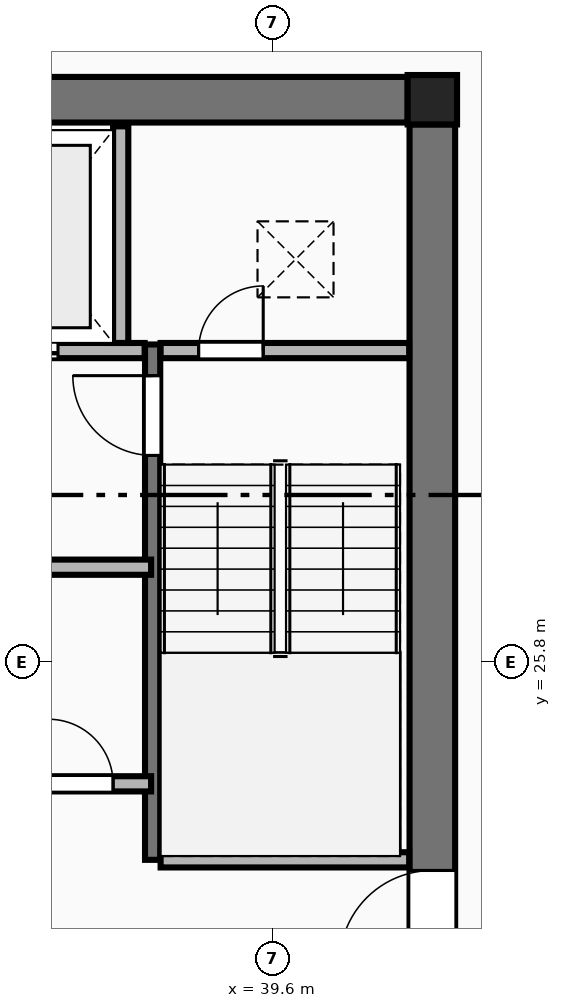
"""IFC4 building model, lengths in metres.
Left out: names, types, materials, properties, quantities, classifications, styles, units other than length and angle.
Written with IfcOpenShell. Run it as: python <this file> out.ifc"""

import sys

from ifc_helpers import new_model, si_unit, direction, frame, frame_2d, origin, origin_2d, place, context, subcontext, project, spatial, rectangle, extrude, element, fill, save


model = new_model("IFC4")
c1 = context("Model", 3, precision=1e-05, world=origin(), true_north=direction((0.0, 1.0)))
c2 = subcontext(c1, "Body", "Model", "MODEL_VIEW")
j1 = project(units=[si_unit("LENGTHUNIT", "METRE"), si_unit("PLANEANGLEUNIT", "RADIAN")], contexts=[c1])
p1 = place(None, origin())
s1 = spatial("IfcSite", under=j1, at=p1, CompositionType="ELEMENT")
p2 = place(p1, origin())
s2 = spatial("IfcBuilding", under=s1, at=p2, CompositionType="ELEMENT")
p3 = place(p2, frame((0.0, 0.0, 203.85)))
s3 = spatial("IfcBuildingStorey", under=s2, at=p3, CompositionType="ELEMENT", Elevation=203.85)
p4 = place(p3, frame((41.7, 33.2, 0.0), z_axis=(0.0, 0.0, 1.0), x_axis=(1.0, 0.0, 0.0)))
e1 = element("IfcColumn", 1, at=p4, inside=s3, PredefinedType="COLUMN", context=c2, shape_type="SweptSolid", body=[
    extrude(rectangle(XDim=0.65, YDim=0.65, at=origin_2d()), origin(), (0.0, 0.0, 1.0), 3.55),
])
p5 = place(p3, frame((23.425, 33.2, 0.0), z_axis=(0.0, 0.0, 1.0), x_axis=(1.0, 0.0, 0.0)))
e2 = element("IfcWall", 2, at=p5, inside=s3, PredefinedType="SHEAR", context=c2, shape_type="SweptSolid", body=[
    extrude(rectangle(XDim=17.95, YDim=0.6, at=frame_2d((8.975, 0.0))), origin(), (0.0, 0.0, 1.0), 3.35),
])
p6 = place(p3, frame((41.7, 18.925, 0.0), z_axis=(0.0, 0.0, 1.0), x_axis=(0.0, 1.0, 0.0)))
e3 = element("IfcWall", 3, at=p6, inside=s3, PredefinedType="SHEAR", context=c2, shape_type="SweptSolid", body=[
    extrude(rectangle(XDim=13.95, YDim=0.6, at=frame_2d((6.975, 0.0))), origin(), (0.0, 0.0, 1.0), 3.35),
])
p7 = place(p6, frame((2.915, 0.0, 0.0)))
e4 = element("IfcOpeningElement", 4, at=p7, cuts=e3, PredefinedType="OPENING", context=c2, shape_type="SweptSolid", body=[
    extrude(rectangle(XDim=1.22, YDim=2.25, at=frame_2d((0.61, 1.125))), frame((0.0, 0.31, 0.0), z_axis=(0.0, -1.0, 0.0), x_axis=(1.0, 0.0, 0.0)), (0.0, 0.0, 1.0), 0.62),
])
p8 = place(p3, frame((38.02, 23.2, 0.0), z_axis=(0.0, 0.0, 1.0), x_axis=(0.0, 1.0, 0.0)))
e5 = element("IfcWall", 5, at=p8, inside=s3, PredefinedType="SHEAR", context=c2, shape_type="SweptSolid", body=[
    extrude(rectangle(XDim=6.78, YDim=0.2, at=frame_2d((3.39, 0.0))), origin(), (0.0, 0.0, 1.0), 3.55),
])
p9 = place(p8, frame((5.32, 0.0, 0.0)))
e6 = element("IfcOpeningElement", 6, at=p9, cuts=e5, PredefinedType="OPENING", context=c2, shape_type="SweptSolid", body=[
    extrude(rectangle(XDim=1.05, YDim=2.15, at=frame_2d((0.525, 1.075))), frame((0.0, 0.11, 0.0), z_axis=(0.0, -1.0, 0.0), x_axis=(1.0, 0.0, 0.0)), (0.0, 0.0, 1.0), 0.22),
])
p10 = place(p3, frame((38.125, 23.2, 0.0), z_axis=(0.0, 0.0, 1.0), x_axis=(1.0, 0.0, 0.0)))
e7 = element("IfcWall", 7, at=p10, inside=s3, PredefinedType="PLUMBINGWALL", context=c2, shape_type="SweptSolid", body=[
    extrude(rectangle(XDim=3.27, YDim=0.2, at=frame_2d((1.635, 0.0))), origin(), (0.0, 0.0, 1.0), 3.35),
])
p11 = place(p3, frame((34.9, 29.9, 0.0), z_axis=(0.0, 0.0, 1.0), x_axis=(1.0, 0.0, 0.0)))
e8 = element("IfcWall", 8, at=p11, inside=s3, PredefinedType="PLUMBINGWALL", context=c2, shape_type="SweptSolid", body=[
    extrude(rectangle(XDim=3.015, YDim=0.2, at=frame_2d((1.508, 0.0))), origin(), (0.0, 0.0, 1.0), 3.35),
])
p12 = place(p11, frame((0.725, 0.0, 0.0)))
e9 = element("IfcOpeningElement", 9, at=p12, cuts=e8, PredefinedType="OPENING", context=c2, shape_type="SweptSolid", body=[
    extrude(rectangle(XDim=1.15, YDim=2.2, at=frame_2d((0.575, 1.1))), frame((0.0, 0.11, 0.0), z_axis=(0.0, -1.0, 0.0), x_axis=(1.0, 0.0, 0.0)), (0.0, 0.0, 1.0), 0.22),
])
p13 = place(p3, frame((38.125, 29.9, 0.0), z_axis=(0.0, 0.0, 1.0), x_axis=(1.0, 0.0, 0.0)))
e10 = element("IfcWall", 10, at=p13, inside=s3, PredefinedType="PLUMBINGWALL", context=c2, shape_type="SweptSolid", body=[
    extrude(rectangle(XDim=3.27, YDim=0.2, at=frame_2d((1.635, 0.0))), origin(), (0.0, 0.0, 1.0), 3.35),
])
p14 = place(p13, frame((0.5, 0.0, 0.0)))
e11 = element("IfcOpeningElement", 11, at=p14, cuts=e10, PredefinedType="OPENING", context=c2, shape_type="SweptSolid", body=[
    extrude(rectangle(XDim=0.85, YDim=2.05, at=frame_2d((0.425, 1.025))), frame((0.0, 0.11, 0.0), z_axis=(0.0, -1.0, 0.0), x_axis=(1.0, 0.0, 0.0)), (0.0, 0.0, 1.0), 0.22),
])
p15 = place(p3, frame((37.6, 30.0, 0.0), z_axis=(0.0, 0.0, 1.0), x_axis=(0.0, 1.0, 0.0)))
e12 = element("IfcWall", 12, at=p15, inside=s3, PredefinedType="PLUMBINGWALL", context=c2, shape_type="SweptSolid", body=[
    extrude(rectangle(XDim=2.85, YDim=0.2, at=frame_2d((1.425, 0.0))), origin(), (0.0, 0.0, 1.0), 3.35),
])
p16 = place(p3, frame((34.8, 27.05, 0.0), z_axis=(0.0, 0.0, 1.0), x_axis=(1.0, 0.0, 0.0)))
e13 = element("IfcWall", 13, at=p16, inside=s3, PredefinedType="PLUMBINGWALL", context=c2, shape_type="SweptSolid", body=[
    extrude(rectangle(XDim=3.2, YDim=0.2, at=frame_2d((1.6, 0.0))), origin(), (0.0, 0.0, 1.0), 3.35),
])
p17 = place(p3, frame((31.2, 24.2, 0.0), z_axis=(0.0, 0.0, 1.0), x_axis=(1.0, 0.0, 0.0)))
e14 = element("IfcWall", 14, at=p17, inside=s3, PredefinedType="PLUMBINGWALL", context=c2, shape_type="SweptSolid", body=[
    extrude(rectangle(XDim=6.8, YDim=0.2, at=frame_2d((3.4, 0.0))), origin(), (0.0, 0.0, 1.0), 3.35),
])
p18 = place(p17, frame((0.65, 0.0, 0.0)))
e15 = element("IfcOpeningElement", 15, at=p18, cuts=e14, PredefinedType="OPENING", context=c2, shape_type="SweptSolid", body=[
    extrude(rectangle(XDim=1.1, YDim=2.2, at=frame_2d((0.55, 1.1))), frame((0.0, 0.11, 0.0), z_axis=(0.0, -1.0, 0.0), x_axis=(1.0, 0.0, 0.0)), (0.0, 0.0, 1.0), 0.22),
])
p19 = place(p17, frame((2.55, 0.0, 0.0)))
e16 = element("IfcOpeningElement", 16, at=p19, cuts=e14, PredefinedType="OPENING", context=c2, shape_type="SweptSolid", body=[
    extrude(rectangle(XDim=0.85, YDim=2.05, at=frame_2d((0.425, 1.025))), frame((0.0, 0.11, 0.0), z_axis=(0.0, -1.0, 0.0), x_axis=(1.0, 0.0, 0.0)), (0.0, 0.0, 1.0), 0.22),
])
p20 = place(p17, frame((4.0, 0.0, 0.0)))
e17 = element("IfcOpeningElement", 17, at=p20, cuts=e14, PredefinedType="OPENING", context=c2, shape_type="SweptSolid", body=[
    extrude(rectangle(XDim=0.85, YDim=2.05, at=frame_2d((0.425, 1.025))), frame((0.0, 0.11, 0.0), z_axis=(0.0, -1.0, 0.0), x_axis=(1.0, 0.0, 0.0)), (0.0, 0.0, 1.0), 0.22),
])
p21 = place(p17, frame((5.45, 0.0, 0.0)))
e18 = element("IfcOpeningElement", 18, at=p21, cuts=e14, PredefinedType="OPENING", context=c2, shape_type="SweptSolid", body=[
    extrude(rectangle(XDim=0.85, YDim=2.05, at=frame_2d((0.425, 1.025))), frame((0.0, 0.11, 0.0), z_axis=(0.0, -1.0, 0.0), x_axis=(1.0, 0.0, 0.0)), (0.0, 0.0, 1.0), 0.22),
])
p22 = place(p7, origin())
e19 = element("IfcDoor", 19, at=p22, inside=s3, OperationType="SINGLE_SWING_LEFT", PredefinedType="DOOR", context=c2, shape_type="SweptSolid", body=[
    extrude(rectangle(XDim=1.22, YDim=2.25, at=frame_2d((0.61, 1.125))), frame((0.0, 0.025, 0.0), z_axis=(0.0, -1.0, 0.0), x_axis=(1.0, 0.0, 0.0)), (0.0, 0.0, 1.0), 0.05),
])
fill(e4, e19)
p23 = place(p9, origin())
e20 = element("IfcDoor", 20, at=p23, inside=s3, OperationType="SINGLE_SWING_RIGHT", PredefinedType="DOOR", context=c2, shape_type="SweptSolid", body=[
    extrude(rectangle(XDim=1.05, YDim=2.15, at=frame_2d((0.525, 1.075))), frame((0.0, 0.025, 0.0), z_axis=(0.0, -1.0, 0.0), x_axis=(1.0, 0.0, 0.0)), (0.0, 0.0, 1.0), 0.05),
])
fill(e6, e20)
p24 = place(p14, origin())
e21 = element("IfcDoor", 21, at=p24, inside=s3, OperationType="SINGLE_SWING_RIGHT", PredefinedType="DOOR", context=c2, shape_type="SweptSolid", body=[
    extrude(rectangle(XDim=0.85, YDim=2.05, at=frame_2d((0.425, 1.025))), frame((0.0, 0.025, 0.0), z_axis=(0.0, -1.0, 0.0), x_axis=(1.0, 0.0, 0.0)), (0.0, 0.0, 1.0), 0.05),
])
fill(e11, e21)
p25 = place(p12, origin())
e22 = element("IfcDoor", 22, at=p25, inside=s3, OperationType="DOUBLE_DOOR_SLIDING", PredefinedType="DOOR", context=c2, shape_type="SweptSolid", body=[
    extrude(rectangle(XDim=1.15, YDim=2.2, at=frame_2d((0.575, 1.1))), frame((0.0, 0.025, 0.0), z_axis=(0.0, -1.0, 0.0), x_axis=(1.0, 0.0, 0.0)), (0.0, 0.0, 1.0), 0.05),
])
fill(e9, e22)
p26 = place(p21, origin())
e23 = element("IfcDoor", 23, at=p26, inside=s3, OperationType="SINGLE_SWING_LEFT", PredefinedType="DOOR", context=c2, shape_type="SweptSolid", body=[
    extrude(rectangle(XDim=0.85, YDim=2.05, at=frame_2d((0.425, 1.025))), frame((0.0, 0.025, 0.0), z_axis=(0.0, -1.0, 0.0), x_axis=(1.0, 0.0, 0.0)), (0.0, 0.0, 1.0), 0.05),
])
fill(e18, e23)
save(model, sys.argv[1])
